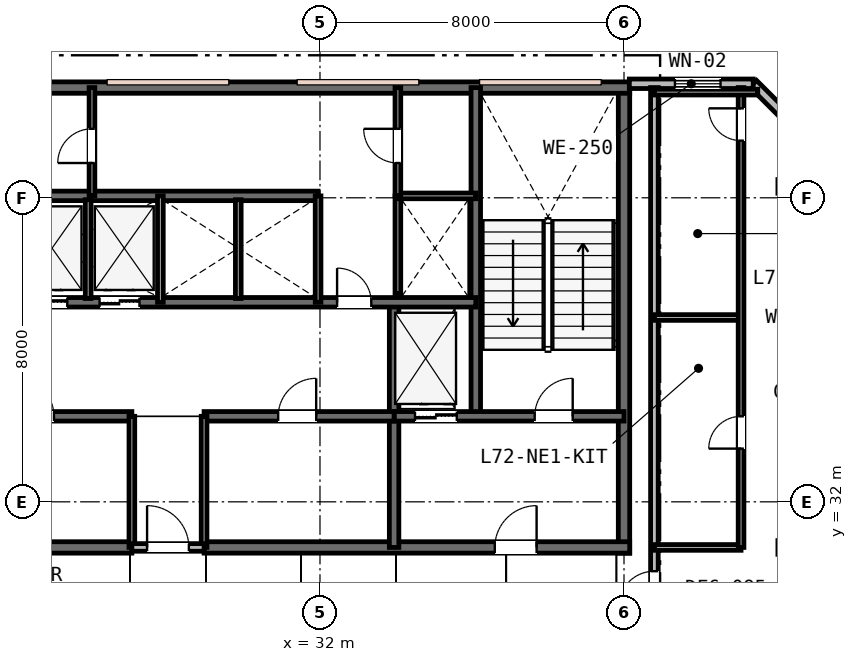
"""IFC4 building model, lengths in metres.
Left out: names, types, materials, properties, quantities, classifications, styles, units other than length and angle.
Written with IfcOpenShell. Run it as: python <this file> out.ifc"""

import sys

from ifc_helpers import new_model, si_unit, direction, frame, frame_2d, origin, place, context, subcontext, project, spatial, rectangle, extrude, element, fill, save


model = new_model("IFC4")
c1 = context("Model", 3, precision=1e-05, world=origin(), true_north=direction((0.0, 1.0)))
c2 = subcontext(c1, "Body", "Model", "MODEL_VIEW")
j1 = project(units=[si_unit("LENGTHUNIT", "METRE"), si_unit("PLANEANGLEUNIT", "RADIAN")], contexts=[c1])
p1 = place(None, origin())
s1 = spatial("IfcSite", under=j1, at=p1, CompositionType="ELEMENT")
p2 = place(p1, origin())
s2 = spatial("IfcBuilding", under=s1, at=p2, CompositionType="ELEMENT")
p3 = place(p2, frame((0.0, 0.0, 279.2)))
s3 = spatial("IfcBuildingStorey", under=s2, at=p3, CompositionType="ELEMENT", Elevation=279.2)
p4 = place(p3, frame((40.0, 30.65, 0.0), z_axis=(0.0, 0.0, 1.0), x_axis=(0.0, 1.0, 0.0)))
e1 = element("IfcWall", 1, at=p4, inside=s3, PredefinedType="SHEAR", context=c2, shape_type="SweptSolid", body=[
    extrude(rectangle(XDim=12.3, YDim=0.3, at=frame_2d((6.15, 0.0))), origin(), (0.0, 0.0, 1.0), 3.8),
])
p5 = place(p3, frame((15.85, 42.9, 0.0), z_axis=(0.0, 0.0, 1.0), x_axis=(1.0, 0.0, 0.0)))
e2 = element("IfcWall", 2, at=p5, inside=s3, PredefinedType="SHEAR", context=c2, shape_type="SweptSolid", body=[
    extrude(rectangle(XDim=24.3, YDim=0.3, at=frame_2d((12.15, 0.0))), origin(), (0.0, 0.0, 1.0), 3.8),
])
p6 = place(p3, frame((15.85, 30.8, 0.0), z_axis=(0.0, 0.0, 1.0), x_axis=(1.0, 0.0, 0.0)))
e3 = element("IfcWall", 3, at=p6, inside=s3, PredefinedType="SHEAR", context=c2, shape_type="SweptSolid", body=[
    extrude(rectangle(XDim=11.2, YDim=0.3, at=frame_2d((5.6, 0.0))), origin(), (0.0, 0.0, 1.0), 3.8),
])
p7 = place(p6, frame((2.45, 0.0, 0.0)))
e4 = element("IfcOpeningElement", 4, at=p7, cuts=e3, PredefinedType="OPENING", context=c2, shape_type="SweptSolid", body=[
    extrude(rectangle(XDim=1.1, YDim=2.15, at=frame_2d((0.55, 1.075))), frame((0.0, 0.16, 0.0), z_axis=(0.0, -1.0, 0.0), x_axis=(1.0, 0.0, 0.0)), (0.0, 0.0, 1.0), 0.32),
])
p8 = place(p3, frame((28.95, 30.8, 0.0), z_axis=(0.0, 0.0, 1.0), x_axis=(1.0, 0.0, 0.0)))
e5 = element("IfcWall", 5, at=p8, inside=s3, PredefinedType="SHEAR", context=c2, shape_type="SweptSolid", body=[
    extrude(rectangle(XDim=11.2, YDim=0.3, at=frame_2d((5.6, 0.0))), origin(), (0.0, 0.0, 1.0), 3.8),
])
p9 = place(p8, frame((7.65, 0.0, 0.0)))
e6 = element("IfcOpeningElement", 6, at=p9, cuts=e5, PredefinedType="OPENING", context=c2, shape_type="SweptSolid", body=[
    extrude(rectangle(XDim=1.1, YDim=2.15, at=frame_2d((0.55, 1.075))), frame((0.0, 0.16, 0.0), z_axis=(0.0, -1.0, 0.0), x_axis=(1.0, 0.0, 0.0)), (0.0, 0.0, 1.0), 0.32),
])
p10 = place(p3, frame((36.1, 34.25, 0.0), z_axis=(0.0, 0.0, 1.0), x_axis=(0.0, 1.0, 0.0)))
e7 = element("IfcWall", 7, at=p10, inside=s3, PredefinedType="SHEAR", context=c2, shape_type="SweptSolid", body=[
    extrude(rectangle(XDim=8.65, YDim=0.25, at=frame_2d((4.325, 0.0))), origin(), (0.0, 0.0, 1.0), 3.8),
])
p11 = place(p3, frame((33.95, 30.8, 0.0), z_axis=(0.0, 0.0, 1.0), x_axis=(0.0, 1.0, 0.0)))
e8 = element("IfcWall", 8, at=p11, inside=s3, PredefinedType="SHEAR", context=c2, shape_type="SweptSolid", body=[
    extrude(rectangle(XDim=6.45, YDim=0.25, at=frame_2d((3.225, 0.0))), origin(), (0.0, 0.0, 1.0), 3.8),
])
p12 = place(p3, frame((33.95, 34.25, 0.0), z_axis=(0.0, 0.0, 1.0), x_axis=(1.0, 0.0, 0.0)))
e9 = element("IfcWall", 9, at=p12, inside=s3, PredefinedType="SHEAR", context=c2, shape_type="SweptSolid", body=[
    extrude(rectangle(XDim=6.05, YDim=0.25, at=frame_2d((3.025, 0.0))), origin(), (0.0, 0.0, 1.0), 3.8),
])
p13 = place(p12, frame((3.7, 0.0, 0.0)))
e10 = element("IfcOpeningElement", 10, at=p13, cuts=e9, PredefinedType="OPENING", context=c2, shape_type="SweptSolid", body=[
    extrude(rectangle(XDim=1.0, YDim=2.15, at=frame_2d((0.5, 1.075))), frame((0.0, 0.135, 0.0), z_axis=(0.0, -1.0, 0.0), x_axis=(1.0, 0.0, 0.0)), (0.0, 0.0, 1.0), 0.27),
])
p14 = place(p12, frame((0.55, 0.0, 0.0)))
e11 = element("IfcOpeningElement", 11, at=p14, cuts=e9, PredefinedType="OPENING", context=c2, shape_type="SweptSolid", body=[
    extrude(rectangle(XDim=1.1, YDim=2.15, at=frame_2d((0.55, 1.075))), frame((0.0, 0.135, 0.0), z_axis=(0.0, -1.0, 0.0), x_axis=(1.0, 0.0, 0.0)), (0.0, 0.0, 1.0), 0.27),
])
p15 = place(p3, frame((22.05, 34.25, 0.0), z_axis=(0.0, 0.0, 1.0), x_axis=(1.0, 0.0, 0.0)))
e12 = element("IfcWall", 12, at=p15, inside=s3, PredefinedType="SHEAR", context=c2, shape_type="SweptSolid", body=[
    extrude(rectangle(XDim=5.0, YDim=0.25, at=frame_2d((2.5, 0.0))), origin(), (0.0, 0.0, 1.0), 3.8),
])
p16 = place(p15, frame((1.95, 0.0, 0.0)))
e13 = element("IfcOpeningElement", 13, at=p16, cuts=e12, PredefinedType="OPENING", context=c2, shape_type="SweptSolid", body=[
    extrude(rectangle(XDim=1.0, YDim=2.15, at=frame_2d((0.5, 1.075))), frame((0.0, 0.135, 0.0), z_axis=(0.0, -1.0, 0.0), x_axis=(1.0, 0.0, 0.0)), (0.0, 0.0, 1.0), 0.27),
])
p17 = place(p3, frame((28.95, 34.25, 0.0), z_axis=(0.0, 0.0, 1.0), x_axis=(1.0, 0.0, 0.0)))
e14 = element("IfcWall", 14, at=p17, inside=s3, PredefinedType="SHEAR", context=c2, shape_type="SweptSolid", body=[
    extrude(rectangle(XDim=5.0, YDim=0.25, at=frame_2d((2.5, 0.0))), origin(), (0.0, 0.0, 1.0), 3.8),
])
p18 = place(p17, frame((1.95, 0.0, 0.0)))
e15 = element("IfcOpeningElement", 15, at=p18, cuts=e14, PredefinedType="OPENING", context=c2, shape_type="SweptSolid", body=[
    extrude(rectangle(XDim=1.0, YDim=2.15, at=frame_2d((0.5, 1.075))), frame((0.0, 0.135, 0.0), z_axis=(0.0, -1.0, 0.0), x_axis=(1.0, 0.0, 0.0)), (0.0, 0.0, 1.0), 0.27),
])
p19 = place(p3, frame((19.9, 37.25, 0.0), z_axis=(0.0, 0.0, 1.0), x_axis=(1.0, 0.0, 0.0)))
e16 = element("IfcWall", 16, at=p19, inside=s3, PredefinedType="SHEAR", context=c2, shape_type="SweptSolid", body=[
    extrude(rectangle(XDim=16.2, YDim=0.25, at=frame_2d((8.1, 0.0))), origin(), (0.0, 0.0, 1.0), 3.8),
])
p20 = place(p19, frame((12.55, 0.0, 0.0)))
e17 = element("IfcOpeningElement", 17, at=p20, cuts=e16, PredefinedType="OPENING", context=c2, shape_type="SweptSolid", body=[
    extrude(rectangle(XDim=0.9, YDim=2.15, at=frame_2d((0.45, 1.075))), frame((0.0, 0.135, 0.0), z_axis=(0.0, -1.0, 0.0), x_axis=(1.0, 0.0, 0.0)), (0.0, 0.0, 1.0), 0.27),
])
p21 = place(p19, frame((2.5, 0.0, 0.0)))
e18 = element("IfcOpeningElement", 18, at=p21, cuts=e16, PredefinedType="OPENING", context=c2, shape_type="SweptSolid", body=[
    extrude(rectangle(XDim=1.05, YDim=2.15, at=frame_2d((0.525, 1.075))), frame((0.0, 0.135, 0.0), z_axis=(0.0, -1.0, 0.0), x_axis=(1.0, 0.0, 0.0)), (0.0, 0.0, 1.0), 0.27),
])
p22 = place(p19, frame((4.4, 0.0, 0.0)))
e19 = element("IfcOpeningElement", 19, at=p22, cuts=e16, PredefinedType="OPENING", context=c2, shape_type="SweptSolid", body=[
    extrude(rectangle(XDim=1.05, YDim=2.15, at=frame_2d((0.525, 1.075))), frame((0.0, 0.135, 0.0), z_axis=(0.0, -1.0, 0.0), x_axis=(1.0, 0.0, 0.0)), (0.0, 0.0, 1.0), 0.27),
])
p23 = place(p19, frame((6.3, 0.0, 0.0)))
e20 = element("IfcOpeningElement", 20, at=p23, cuts=e16, PredefinedType="OPENING", context=c2, shape_type="SweptSolid", body=[
    extrude(rectangle(XDim=1.05, YDim=2.15, at=frame_2d((0.525, 1.075))), frame((0.0, 0.135, 0.0), z_axis=(0.0, -1.0, 0.0), x_axis=(1.0, 0.0, 0.0)), (0.0, 0.0, 1.0), 0.27),
])
p24 = place(p3, frame((19.9, 40.05, 0.0), z_axis=(0.0, 0.0, 1.0), x_axis=(1.0, 0.0, 0.0)))
e21 = element("IfcWall", 21, at=p24, inside=s3, PredefinedType="SHEAR", context=c2, shape_type="SweptSolid", body=[
    extrude(rectangle(XDim=12.05, YDim=0.25, at=frame_2d((6.025, 0.0))), origin(), (0.0, 0.0, 1.0), 3.8),
])
p25 = place(p3, frame((46.0, 40.4, 0.0), z_axis=(0.0, 0.0, 1.0), x_axis=(-0.707106781187, 0.707106781187, 0.0)))
e22 = element("IfcWall", 22, at=p25, inside=s3, PredefinedType="STANDARD", context=c2, shape_type="SweptSolid", body=[
    extrude(rectangle(XDim=3.677, YDim=0.25, at=frame_2d((1.839, 0.0))), origin(), (0.0, 0.0, 1.0), 3.53),
])
p26 = place(p25, frame((0.828, 0.0, 0.75)))
e23 = element("IfcOpeningElement", 23, at=p26, cuts=e22, PredefinedType="OPENING", context=c2, shape_type="SweptSolid", body=[
    extrude(rectangle(XDim=1.8, YDim=1.85, at=frame_2d((0.9, 0.925))), frame((0.0, 0.135, 0.0), z_axis=(0.0, -1.0, 0.0), x_axis=(1.0, 0.0, 0.0)), (0.0, 0.0, 1.0), 0.27),
])
p27 = place(p3, frame((43.4, 43.0, 0.0), z_axis=(0.0, 0.0, 1.0), x_axis=(-1.0, 0.0, 0.0)))
e24 = element("IfcWall", 24, at=p27, inside=s3, PredefinedType="STANDARD", context=c2, shape_type="SweptSolid", body=[
    extrude(rectangle(XDim=3.26, YDim=0.25, at=frame_2d((1.63, 0.0))), origin(), (0.0, 0.0, 1.0), 3.53),
])
p28 = place(p27, frame((0.86, 0.0, 0.85)))
e25 = element("IfcOpeningElement", 25, at=p28, cuts=e24, PredefinedType="OPENING", context=c2, shape_type="SweptSolid", body=[
    extrude(rectangle(XDim=1.2, YDim=1.6, at=frame_2d((0.6, 0.8))), frame((0.0, 0.135, 0.0), z_axis=(0.0, -1.0, 0.0), x_axis=(1.0, 0.0, 0.0)), (0.0, 0.0, 1.0), 0.27),
])
for number, where, z_axis, x_axis in (
    (26, (27.05, 30.8, 0.0), (0.0, 0.0, 1.0), (0.0, 1.0, 0.0)),
    (27, (28.95, 30.8, 0.0), (0.0, 0.0, 1.0), (0.0, 1.0, 0.0)),
):
    element("IfcWall", number, at=place(p3, frame(where, z_axis=z_axis, x_axis=x_axis)), inside=s3, PredefinedType="PLUMBINGWALL", context=c2, shape_type="SweptSolid", body=[
        extrude(rectangle(XDim=3.45, YDim=0.15, at=frame_2d((1.725, 0.0))), origin(), (0.0, 0.0, 1.0), 3.28),
    ])
p29 = place(p3, frame((27.05, 30.8, 0.0), z_axis=(0.0, 0.0, 1.0), x_axis=(1.0, 0.0, 0.0)))
e28 = element("IfcWall", 28, at=p29, inside=s3, PredefinedType="PARTITIONING", context=c2, shape_type="SweptSolid", body=[
    extrude(rectangle(XDim=1.9, YDim=0.2, at=frame_2d((0.95, 0.0))), origin(), (0.0, 0.0, 1.0), 3.28),
])
p30 = place(p29, frame((0.4, 0.0, 0.0)))
e29 = element("IfcOpeningElement", 29, at=p30, cuts=e28, PredefinedType="OPENING", context=c2, shape_type="SweptSolid", body=[
    extrude(rectangle(XDim=1.1, YDim=2.15, at=frame_2d((0.55, 1.075))), frame((0.0, 0.11, 0.0), z_axis=(0.0, -1.0, 0.0), x_axis=(1.0, 0.0, 0.0)), (0.0, 0.0, 1.0), 0.22),
])
p31 = place(p3, frame((27.8, 37.25, 0.0), z_axis=(0.0, 0.0, 1.0), x_axis=(0.0, 1.0, 0.0)))
e30 = element("IfcWall", 30, at=p31, inside=s3, PredefinedType="PLUMBINGWALL", context=c2, shape_type="SweptSolid", body=[
    extrude(rectangle(XDim=2.8, YDim=0.15, at=frame_2d((1.4, 0.0))), origin(), (0.0, 0.0, 1.0), 3.53),
])
p32 = place(p3, frame((25.9, 37.35, 0.0), z_axis=(0.0, 0.0, 1.0), x_axis=(0.0, 1.0, 0.0)))
e31 = element("IfcWall", 31, at=p32, inside=s3, PredefinedType="PLUMBINGWALL", context=c2, shape_type="SweptSolid", body=[
    extrude(rectangle(XDim=2.6, YDim=0.15, at=frame_2d((1.3, 0.0))), origin(), (0.0, 0.0, 1.0), 3.53),
])
p33 = place(p3, frame((31.95, 37.25, 0.0), z_axis=(0.0, 0.0, 1.0), x_axis=(0.0, 1.0, 0.0)))
e32 = element("IfcWall", 32, at=p33, inside=s3, PredefinedType="PLUMBINGWALL", context=c2, shape_type="SweptSolid", body=[
    extrude(rectangle(XDim=2.8, YDim=0.15, at=frame_2d((1.4, 0.0))), origin(), (0.0, 0.0, 1.0), 3.53),
])
p34 = place(p3, frame((29.85, 37.35, 0.0), z_axis=(0.0, 0.0, 1.0), x_axis=(0.0, 1.0, 0.0)))
e33 = element("IfcWall", 33, at=p34, inside=s3, PredefinedType="PLUMBINGWALL", context=c2, shape_type="SweptSolid", body=[
    extrude(rectangle(XDim=2.6, YDim=0.15, at=frame_2d((1.3, 0.0))), origin(), (0.0, 0.0, 1.0), 3.53),
])
p35 = place(p3, frame((34.05, 37.473, 0.0), z_axis=(0.0, 0.0, 1.0), x_axis=(0.0, 1.0, 0.0)))
e34 = element("IfcWall", 34, at=p35, inside=s3, PredefinedType="PLUMBINGWALL", context=c2, shape_type="SweptSolid", body=[
    extrude(rectangle(XDim=2.577, YDim=0.15, at=frame_2d((1.288, 0.0))), origin(), (0.0, 0.0, 1.0), 3.53),
])
p36 = place(p3, frame((34.05, 40.05, 0.0), z_axis=(0.0, 0.0, 1.0), x_axis=(1.0, 0.0, 0.0)))
e35 = element("IfcWall", 35, at=p36, inside=s3, PredefinedType="PARTITIONING", context=c2, shape_type="SweptSolid", body=[
    extrude(rectangle(XDim=2.05, YDim=0.15, at=frame_2d((1.025, 0.0))), origin(), (0.0, 0.0, 1.0), 3.53),
])
p37 = place(p3, frame((34.05, 40.05, 0.0), z_axis=(0.0, 0.0, 1.0), x_axis=(0.0, 1.0, 0.0)))
e36 = element("IfcWall", 36, at=p37, inside=s3, PredefinedType="PARTITIONING", context=c2, shape_type="SweptSolid", body=[
    extrude(rectangle(XDim=2.85, YDim=0.15, at=frame_2d((1.425, 0.0))), origin(), (0.0, 0.0, 1.0), 3.53),
])
p38 = place(p37, frame((0.865, 0.0, 0.0)))
e37 = element("IfcOpeningElement", 37, at=p38, cuts=e36, PredefinedType="OPENING", context=c2, shape_type="SweptSolid", body=[
    extrude(rectangle(XDim=0.9, YDim=2.15, at=frame_2d((0.45, 1.075))), frame((0.0, 0.085, 0.0), z_axis=(0.0, -1.0, 0.0), x_axis=(1.0, 0.0, 0.0)), (0.0, 0.0, 1.0), 0.17),
])
p39 = place(p3, frame((26.0, 40.05, 0.0), z_axis=(0.0, 0.0, 1.0), x_axis=(0.0, 1.0, 0.0)))
e38 = element("IfcWall", 38, at=p39, inside=s3, PredefinedType="PARTITIONING", context=c2, shape_type="SweptSolid", body=[
    extrude(rectangle(XDim=2.85, YDim=0.15, at=frame_2d((1.425, 0.0))), origin(), (0.0, 0.0, 1.0), 3.53),
])
p40 = place(p39, frame((0.865, 0.0, 0.0)))
e39 = element("IfcOpeningElement", 39, at=p40, cuts=e38, PredefinedType="OPENING", context=c2, shape_type="SweptSolid", body=[
    extrude(rectangle(XDim=0.9, YDim=2.15, at=frame_2d((0.45, 1.075))), frame((0.0, 0.085, 0.0), z_axis=(0.0, -1.0, 0.0), x_axis=(1.0, 0.0, 0.0)), (0.0, 0.0, 1.0), 0.17),
])
p41 = place(p3, frame((40.8, 28.6, 0.0), z_axis=(0.0, 0.0, 1.0), x_axis=(0.0, 1.0, 0.0)))
e40 = element("IfcWall", 40, at=p41, inside=s3, PredefinedType="PARTITIONING", context=c2, shape_type="SweptSolid", body=[
    extrude(rectangle(XDim=14.3, YDim=0.2, at=frame_2d((7.15, 0.0))), origin(), (0.0, 0.0, 1.0), 3.16),
])
p42 = place(p41, frame((0.625, 0.0, 0.0)))
e41 = element("IfcOpeningElement", 41, at=p42, cuts=e40, PredefinedType="OPENING", context=c2, shape_type="SweptSolid", body=[
    extrude(rectangle(XDim=0.95, YDim=2.15, at=frame_2d((0.475, 1.075))), frame((0.0, 0.11, 0.0), z_axis=(0.0, -1.0, 0.0), x_axis=(1.0, 0.0, 0.0)), (0.0, 0.0, 1.0), 0.22),
])
p43 = place(p3, frame((40.8, 30.8, 0.0), z_axis=(0.0, 0.0, 1.0), x_axis=(1.0, 0.0, 0.0)))
e42 = element("IfcWall", 42, at=p43, inside=s3, PredefinedType="PARTITIONING", context=c2, shape_type="SweptSolid", body=[
    extrude(rectangle(XDim=2.28, YDim=0.15, at=frame_2d((1.14, 0.0))), origin(), (0.0, 0.0, 1.0), 3.16),
])
p44 = place(p3, frame((40.8, 36.85, 0.0), z_axis=(0.0, 0.0, 1.0), x_axis=(1.0, 0.0, 0.0)))
e43 = element("IfcWall", 43, at=p44, inside=s3, PredefinedType="PARTITIONING", context=c2, shape_type="SweptSolid", body=[
    extrude(rectangle(XDim=2.28, YDim=0.15, at=frame_2d((1.14, 0.0))), origin(), (0.0, 0.0, 1.0), 3.53),
])
p45 = place(p3, frame((43.08, 30.8, 0.0), z_axis=(0.0, 0.0, 1.0), x_axis=(0.0, 1.0, 0.0)))
e44 = element("IfcWall", 44, at=p45, inside=s3, PredefinedType="PARTITIONING", context=c2, shape_type="SweptSolid", body=[
    extrude(rectangle(XDim=12.1, YDim=0.15, at=frame_2d((6.05, 0.0))), origin(), (0.0, 0.0, 1.0), 3.16),
])
p46 = place(p45, frame((2.6, 0.0, 0.0)))
e45 = element("IfcOpeningElement", 45, at=p46, cuts=e44, PredefinedType="OPENING", context=c2, shape_type="SweptSolid", body=[
    extrude(rectangle(XDim=0.85, YDim=2.15, at=frame_2d((0.425, 1.075))), frame((0.0, 0.085, 0.0), z_axis=(0.0, -1.0, 0.0), x_axis=(1.0, 0.0, 0.0)), (0.0, 0.0, 1.0), 0.17),
])
p47 = place(p45, frame((10.704, 0.0, 0.0)))
e46 = element("IfcOpeningElement", 46, at=p47, cuts=e44, PredefinedType="OPENING", context=c2, shape_type="SweptSolid", body=[
    extrude(rectangle(XDim=0.85, YDim=2.15, at=frame_2d((0.425, 1.075))), frame((0.0, 0.085, 0.0), z_axis=(0.0, -1.0, 0.0), x_axis=(1.0, 0.0, 0.0)), (0.0, 0.0, 1.0), 0.17),
])
p48 = place(p3, frame((40.8, 42.78, 0.0), z_axis=(0.0, 0.0, 1.0), x_axis=(1.0, 0.0, 0.0)))
e47 = element("IfcWall", 47, at=p48, inside=s3, PredefinedType="PARTITIONING", context=c2, shape_type="SweptSolid", body=[
    extrude(rectangle(XDim=2.72, YDim=0.15, at=frame_2d((1.36, 0.0))), origin(), (0.0, 0.0, 1.0), 3.53),
])
p49 = place(p28, origin())
e48 = element("IfcWindow", 48, at=p49, inside=s3, PartitioningType="SINGLE_PANEL", PredefinedType="WINDOW", context=c2, shape_type="SweptSolid", body=[
    extrude(rectangle(XDim=1.2, YDim=1.6, at=frame_2d((0.6, 0.8))), frame((0.0, 0.03, 0.0), z_axis=(0.0, -1.0, 0.0), x_axis=(1.0, 0.0, 0.0)), (0.0, 0.0, 1.0), 0.06),
])
fill(e25, e48)
p50 = place(p30, origin())
e49 = element("IfcDoor", 49, at=p50, inside=s3, OperationType="SINGLE_SWING_LEFT", PredefinedType="DOOR", context=c2, shape_type="SweptSolid", body=[
    extrude(rectangle(XDim=1.1, YDim=2.15, at=frame_2d((0.55, 1.075))), frame((0.0, 0.025, 0.0), z_axis=(0.0, -1.0, 0.0), x_axis=(1.0, 0.0, 0.0)), (0.0, 0.0, 1.0), 0.05),
])
fill(e29, e49)
p51 = place(p13, origin())
e50 = element("IfcDoor", 50, at=p51, inside=s3, OperationType="SINGLE_SWING_RIGHT", PredefinedType="DOOR", context=c2, shape_type="SweptSolid", body=[
    extrude(rectangle(XDim=1.0, YDim=2.15, at=frame_2d((0.5, 1.075))), frame((0.0, 0.025, 0.0), z_axis=(0.0, -1.0, 0.0), x_axis=(1.0, 0.0, 0.0)), (0.0, 0.0, 1.0), 0.05),
])
fill(e10, e50)
p52 = place(p9, origin())
e51 = element("IfcDoor", 51, at=p52, inside=s3, OperationType="SINGLE_SWING_RIGHT", PredefinedType="DOOR", context=c2, shape_type="SweptSolid", body=[
    extrude(rectangle(XDim=1.1, YDim=2.15, at=frame_2d((0.55, 1.075))), frame((0.0, 0.025, 0.0), z_axis=(0.0, -1.0, 0.0), x_axis=(1.0, 0.0, 0.0)), (0.0, 0.0, 1.0), 0.05),
])
fill(e6, e51)
p53 = place(p16, origin())
e52 = element("IfcDoor", 52, at=p53, inside=s3, OperationType="SINGLE_SWING_LEFT", PredefinedType="DOOR", context=c2, shape_type="SweptSolid", body=[
    extrude(rectangle(XDim=1.0, YDim=2.15, at=frame_2d((0.5, 1.075))), frame((0.0, 0.025, 0.0), z_axis=(0.0, -1.0, 0.0), x_axis=(1.0, 0.0, 0.0)), (0.0, 0.0, 1.0), 0.05),
])
fill(e13, e52)
p54 = place(p18, origin())
e53 = element("IfcDoor", 53, at=p54, inside=s3, OperationType="SINGLE_SWING_RIGHT", PredefinedType="DOOR", context=c2, shape_type="SweptSolid", body=[
    extrude(rectangle(XDim=1.0, YDim=2.15, at=frame_2d((0.5, 1.075))), frame((0.0, 0.025, 0.0), z_axis=(0.0, -1.0, 0.0), x_axis=(1.0, 0.0, 0.0)), (0.0, 0.0, 1.0), 0.05),
])
fill(e15, e53)
p55 = place(p20, origin())
e54 = element("IfcDoor", 54, at=p55, inside=s3, OperationType="SINGLE_SWING_LEFT", PredefinedType="DOOR", context=c2, shape_type="SweptSolid", body=[
    extrude(rectangle(XDim=0.9, YDim=2.15, at=frame_2d((0.45, 1.075))), frame((0.0, 0.025, 0.0), z_axis=(0.0, -1.0, 0.0), x_axis=(1.0, 0.0, 0.0)), (0.0, 0.0, 1.0), 0.05),
])
fill(e17, e54)
p56 = place(p38, origin())
e55 = element("IfcDoor", 55, at=p56, inside=s3, OperationType="SINGLE_SWING_RIGHT", PredefinedType="DOOR", context=c2, shape_type="SweptSolid", body=[
    extrude(rectangle(XDim=0.9, YDim=2.15, at=frame_2d((0.45, 1.075))), frame((0.0, 0.025, 0.0), z_axis=(0.0, -1.0, 0.0), x_axis=(1.0, 0.0, 0.0)), (0.0, 0.0, 1.0), 0.05),
])
fill(e37, e55)
p57 = place(p40, origin())
e56 = element("IfcDoor", 56, at=p57, inside=s3, OperationType="SINGLE_SWING_LEFT", PredefinedType="DOOR", context=c2, shape_type="SweptSolid", body=[
    extrude(rectangle(XDim=0.9, YDim=2.15, at=frame_2d((0.45, 1.075))), frame((0.0, 0.025, 0.0), z_axis=(0.0, -1.0, 0.0), x_axis=(1.0, 0.0, 0.0)), (0.0, 0.0, 1.0), 0.05),
])
fill(e39, e56)
p58 = place(p42, origin())
e57 = element("IfcDoor", 57, at=p58, inside=s3, OperationType="SINGLE_SWING_LEFT", PredefinedType="DOOR", context=c2, shape_type="SweptSolid", body=[
    extrude(rectangle(XDim=0.95, YDim=2.15, at=frame_2d((0.475, 1.075))), frame((0.0, 0.025, 0.0), z_axis=(0.0, -1.0, 0.0), x_axis=(1.0, 0.0, 0.0)), (0.0, 0.0, 1.0), 0.05),
])
fill(e41, e57)
p59 = place(p46, origin())
e58 = element("IfcDoor", 58, at=p59, inside=s3, OperationType="SINGLE_SWING_LEFT", PredefinedType="DOOR", context=c2, shape_type="SweptSolid", body=[
    extrude(rectangle(XDim=0.85, YDim=2.15, at=frame_2d((0.425, 1.075))), frame((0.0, 0.025, 0.0), z_axis=(0.0, -1.0, 0.0), x_axis=(1.0, 0.0, 0.0)), (0.0, 0.0, 1.0), 0.05),
])
fill(e45, e58)
p60 = place(p47, origin())
e59 = element("IfcDoor", 59, at=p60, inside=s3, OperationType="SINGLE_SWING_RIGHT", PredefinedType="DOOR", context=c2, shape_type="SweptSolid", body=[
    extrude(rectangle(XDim=0.85, YDim=2.15, at=frame_2d((0.425, 1.075))), frame((0.0, 0.025, 0.0), z_axis=(0.0, -1.0, 0.0), x_axis=(1.0, 0.0, 0.0)), (0.0, 0.0, 1.0), 0.05),
])
fill(e46, e59)
p61 = place(p14, origin())
e60 = element("IfcDoor", 60, at=p61, inside=s3, OperationType="DOUBLE_DOOR_SLIDING", PredefinedType="DOOR", context=c2, shape_type="SweptSolid", body=[
    extrude(rectangle(XDim=1.1, YDim=2.15, at=frame_2d((0.55, 1.075))), frame((0.0, 0.025, 0.0), z_axis=(0.0, -1.0, 0.0), x_axis=(1.0, 0.0, 0.0)), (0.0, 0.0, 1.0), 0.05),
])
fill(e11, e60)
p62 = place(p22, origin())
e61 = element("IfcDoor", 61, at=p62, inside=s3, OperationType="DOUBLE_DOOR_SLIDING", PredefinedType="DOOR", context=c2, shape_type="SweptSolid", body=[
    extrude(rectangle(XDim=1.05, YDim=2.15, at=frame_2d((0.525, 1.075))), frame((0.0, 0.025, 0.0), z_axis=(0.0, -1.0, 0.0), x_axis=(1.0, 0.0, 0.0)), (0.0, 0.0, 1.0), 0.05),
])
fill(e19, e61)
p63 = place(p23, origin())
e62 = element("IfcDoor", 62, at=p63, inside=s3, OperationType="DOUBLE_DOOR_SLIDING", PredefinedType="DOOR", context=c2, shape_type="SweptSolid", body=[
    extrude(rectangle(XDim=1.05, YDim=2.15, at=frame_2d((0.525, 1.075))), frame((0.0, 0.025, 0.0), z_axis=(0.0, -1.0, 0.0), x_axis=(1.0, 0.0, 0.0)), (0.0, 0.0, 1.0), 0.05),
])
fill(e20, e62)
save(model, sys.argv[1])
